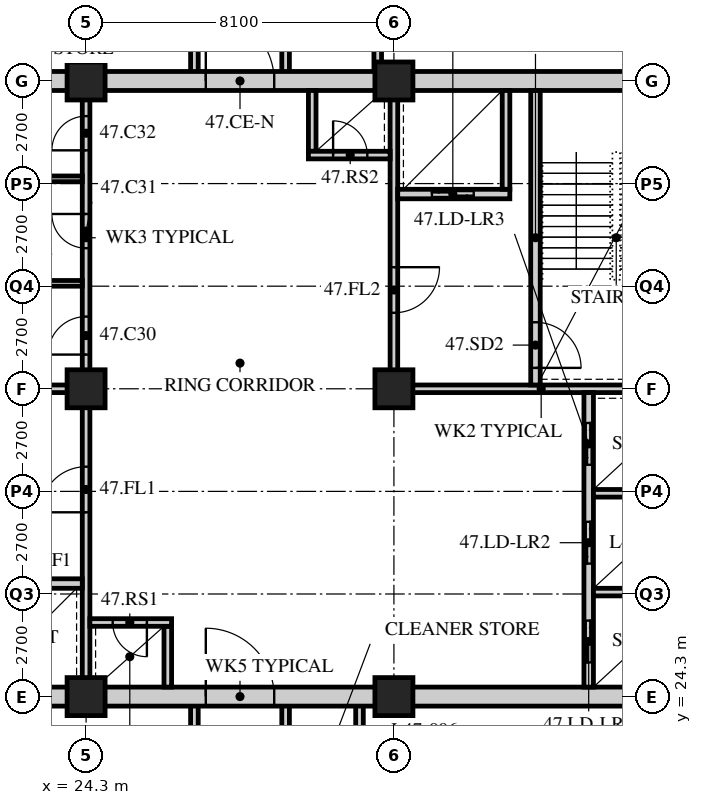
"""IFC4 building model, lengths in metres.
Left out: names, types, materials, properties, quantities, classifications, styles, units other than length and angle.
Written with IfcOpenShell. Run it as: python <this file> out.ifc"""

import sys

from ifc_helpers import new_model, si_unit, direction, frame, frame_2d, origin, origin_2d, place, context, subcontext, project, spatial, rectangle, hollow_rectangle, extrude, element, fill, save


model = new_model("IFC4")
c1 = context("Model", 3, precision=1e-05, world=origin(), true_north=direction((0.0, 1.0)))
c2 = subcontext(c1, "Body", "Model", "MODEL_VIEW")
j1 = project(units=[si_unit("LENGTHUNIT", "METRE"), si_unit("PLANEANGLEUNIT", "RADIAN")], contexts=[c1])
p1 = place(None, origin())
s1 = spatial("IfcSite", under=j1, at=p1, CompositionType="ELEMENT")
p2 = place(p1, origin())
s2 = spatial("IfcBuilding", under=s1, at=p2, CompositionType="ELEMENT")
p3 = place(p2, frame((0.0, 0.0, 184.8)))
s3 = spatial("IfcBuildingStorey", under=s2, at=p3, CompositionType="ELEMENT", Elevation=184.8)
for number, where, z_axis, x_axis in (
    (1, (24.3, 24.3, 0.0), (0.0, 0.0, 1.0), (1.0, 0.0, 0.0)),
    (2, (24.3, 32.4, 0.0), (0.0, 0.0, 1.0), (1.0, 0.0, 0.0)),
    (3, (24.3, 40.5, 0.0), (0.0, 0.0, 1.0), (1.0, 0.0, 0.0)),
    (4, (32.4, 24.3, 0.0), (0.0, 0.0, 1.0), (1.0, 0.0, 0.0)),
    (5, (32.4, 32.4, 0.0), (0.0, 0.0, 1.0), (1.0, 0.0, 0.0)),
    (6, (32.4, 40.5, 0.0), (0.0, 0.0, 1.0), (1.0, 0.0, 0.0)),
):
    element("IfcColumn", number, at=place(p3, frame(where, z_axis=z_axis, x_axis=x_axis)), inside=s3, PredefinedType="COLUMN", context=c2, shape_type="SweptSolid", body=[
        extrude(hollow_rectangle(XDim=1.0, YDim=1.0, WallThickness=0.1, at=origin_2d()), origin(), (0.0, 0.0, 1.0), 3.6),
    ])
for number, where, z_axis, x_axis in (
    (7, (31.494, 20.7, 0.0), (0.0, 0.0, 1.0), (0.0, 1.0, 0.0)),
    (8, (27.15, 20.7, 0.0), (0.0, 0.0, 1.0), (0.0, 1.0, 0.0)),
    (9, (29.55, 20.7, 0.0), (0.0, 0.0, 1.0), (0.0, 1.0, 0.0)),
):
    element("IfcWall", number, at=place(p3, frame(where, z_axis=z_axis, x_axis=x_axis)), inside=s3, PredefinedType="SOLIDWALL", context=c2, shape_type="SweptSolid", body=[
        extrude(rectangle(XDim=3.6, YDim=0.2, at=frame_2d((1.8, 0.0))), origin(), (0.0, 0.0, 1.0), 3.39),
    ])
p4 = place(p3, frame((31.974, 45.45, 0.0), z_axis=(0.0, 0.0, 1.0), x_axis=(0.0, -1.0, 0.0)))
e10 = element("IfcWall", 10, at=p4, inside=s3, PredefinedType="SOLIDWALL", context=c2, shape_type="SweptSolid", body=[
    extrude(rectangle(XDim=4.95, YDim=0.2, at=frame_2d((2.475, 0.0))), origin(), (0.0, 0.0, 1.0), 2.69),
])
for number, where, z_axis, x_axis in (
    (11, (27.15, 40.5, 0.0), (0.0, 0.0, 1.0), (0.0, 1.0, 0.0)),
    (12, (29.55, 40.5, 0.0), (0.0, 0.0, 1.0), (0.0, 1.0, 0.0)),
):
    element("IfcWall", number, at=place(p3, frame(where, z_axis=z_axis, x_axis=x_axis)), inside=s3, PredefinedType="SOLIDWALL", context=c2, shape_type="SweptSolid", body=[
        extrude(rectangle(XDim=4.95, YDim=0.2, at=frame_2d((2.475, 0.0))), origin(), (0.0, 0.0, 1.0), 3.39),
    ])
p5 = place(p3, frame((15.95, 24.3, 0.0), z_axis=(0.0, 0.0, 1.0), x_axis=(1.0, 0.0, 0.0)))
e13 = element("IfcWall", 13, at=p5, inside=s3, PredefinedType="SOLIDWALL", context=c2, shape_type="SweptSolid", body=[
    extrude(rectangle(XDim=24.8, YDim=0.5, at=frame_2d((12.4, 0.0))), origin(), (0.0, 0.0, 1.0), 2.74),
])
p6 = place(p5, frame((11.5, 0.0, 0.0)))
e14 = element("IfcOpeningElement", 14, at=p6, cuts=e13, PredefinedType="OPENING", context=c2, shape_type="SweptSolid", body=[
    extrude(rectangle(XDim=1.8, YDim=2.4, at=frame_2d((0.9, 1.2))), frame((0.0, 0.26, 0.0), z_axis=(0.0, -1.0, 0.0), x_axis=(1.0, 0.0, 0.0)), (0.0, 0.0, 1.0), 0.52),
])
p7 = place(p3, frame((15.95, 40.5, 0.0), z_axis=(0.0, 0.0, 1.0), x_axis=(1.0, 0.0, 0.0)))
e15 = element("IfcWall", 15, at=p7, inside=s3, PredefinedType="SOLIDWALL", context=c2, shape_type="SweptSolid", body=[
    extrude(rectangle(XDim=24.8, YDim=0.5, at=frame_2d((12.4, 0.0))), origin(), (0.0, 0.0, 1.0), 2.74),
])
p8 = place(p7, frame((11.5, 0.0, 0.0)))
e16 = element("IfcOpeningElement", 16, at=p8, cuts=e15, PredefinedType="OPENING", context=c2, shape_type="SweptSolid", body=[
    extrude(rectangle(XDim=1.8, YDim=2.4, at=frame_2d((0.9, 1.2))), frame((0.0, 0.26, 0.0), z_axis=(0.0, -1.0, 0.0), x_axis=(1.0, 0.0, 0.0)), (0.0, 0.0, 1.0), 0.52),
])
p9 = place(p3, frame((16.45, 32.4, 0.0), z_axis=(0.0, 0.0, 1.0), x_axis=(1.0, 0.0, 0.0)))
e17 = element("IfcWall", 17, at=p9, inside=s3, PredefinedType="SOLIDWALL", context=c2, shape_type="SweptSolid", body=[
    extrude(rectangle(XDim=7.95, YDim=0.2, at=frame_2d((3.975, 0.0))), origin(), (0.0, 0.0, 1.0), 2.778),
])
p10 = place(p3, frame((24.3, 24.55, 0.0), z_axis=(0.0, 0.0, 1.0), x_axis=(0.0, 1.0, 0.0)))
e18 = element("IfcWall", 18, at=p10, inside=s3, PredefinedType="SOLIDWALL", context=c2, shape_type="SweptSolid", body=[
    extrude(rectangle(XDim=7.75, YDim=0.2, at=frame_2d((3.875, 0.0))), origin(), (0.0, 0.0, 1.0), 2.778),
])
p11 = place(p10, frame((4.6, 0.0, 0.0)))
e19 = element("IfcOpeningElement", 19, at=p11, cuts=e18, PredefinedType="OPENING", context=c2, shape_type="SweptSolid", body=[
    extrude(rectangle(XDim=1.2, YDim=2.1, at=frame_2d((0.6, 1.05))), frame((0.0, 0.11, 0.0), z_axis=(0.0, -1.0, 0.0), x_axis=(1.0, 0.0, 0.0)), (0.0, 0.0, 1.0), 0.22),
])
p12 = place(p3, frame((21.25, 27.275, 0.0), z_axis=(0.0, 0.0, 1.0), x_axis=(1.0, 0.0, 0.0)))
e20 = element("IfcWall", 20, at=p12, inside=s3, PredefinedType="SOLIDWALL", context=c2, shape_type="SweptSolid", body=[
    extrude(rectangle(XDim=2.95, YDim=0.25, at=frame_2d((1.475, 0.0))), origin(), (0.0, 0.0, 1.0), 3.39),
])
p13 = place(p12, frame((0.95, 0.0, 0.0)))
e21 = element("IfcOpeningElement", 21, at=p13, cuts=e20, PredefinedType="OPENING", context=c2, shape_type="SweptSolid", body=[
    extrude(rectangle(XDim=1.1, YDim=2.4, at=frame_2d((0.55, 1.2))), frame((0.0, 0.135, 0.0), z_axis=(0.0, -1.0, 0.0), x_axis=(1.0, 0.0, 0.0)), (0.0, 0.0, 1.0), 0.27),
])
p14 = place(p3, frame((26.45, 24.55, 0.0), z_axis=(0.0, 0.0, 1.0), x_axis=(0.0, 1.0, 0.0)))
e22 = element("IfcWall", 22, at=p14, inside=s3, PredefinedType="SOLIDWALL", context=c2, shape_type="SweptSolid", body=[
    extrude(rectangle(XDim=1.6, YDim=0.2, at=frame_2d((0.8, 0.0))), origin(), (0.0, 0.0, 1.0), 3.39),
])
p15 = place(p3, frame((24.4, 26.25, 0.0), z_axis=(0.0, 0.0, 1.0), x_axis=(1.0, 0.0, 0.0)))
e23 = element("IfcWall", 23, at=p15, inside=s3, PredefinedType="SOLIDWALL", context=c2, shape_type="SweptSolid", body=[
    extrude(rectangle(XDim=2.15, YDim=0.2, at=frame_2d((1.075, 0.0))), origin(), (0.0, 0.0, 1.0), 3.39),
])
p16 = place(p15, frame((0.6, 0.0, 0.0)))
e24 = element("IfcOpeningElement", 24, at=p16, cuts=e23, PredefinedType="OPENING", context=c2, shape_type="SweptSolid", body=[
    extrude(rectangle(XDim=0.9, YDim=2.1, at=frame_2d((0.45, 1.05))), frame((0.0, 0.11, 0.0), z_axis=(0.0, -1.0, 0.0), x_axis=(1.0, 0.0, 0.0)), (0.0, 0.0, 1.0), 0.22),
])
p17 = place(p3, frame((32.3, 32.4, 0.0), z_axis=(0.0, 0.0, 1.0), x_axis=(1.0, 0.0, 0.0)))
e25 = element("IfcWall", 25, at=p17, inside=s3, PredefinedType="SOLIDWALL", context=c2, shape_type="SweptSolid", body=[
    extrude(rectangle(XDim=7.95, YDim=0.2, at=frame_2d((3.975, 0.0))), origin(), (0.0, 0.0, 1.0), 2.778),
])
p18 = place(p3, frame((32.4, 32.5, 0.0), z_axis=(0.0, 0.0, 1.0), x_axis=(0.0, 1.0, 0.0)))
e26 = element("IfcWall", 26, at=p18, inside=s3, PredefinedType="SOLIDWALL", context=c2, shape_type="SweptSolid", body=[
    extrude(rectangle(XDim=7.75, YDim=0.2, at=frame_2d((3.875, 0.0))), origin(), (0.0, 0.0, 1.0), 2.778),
])
p19 = place(p18, frame((1.9, 0.0, 0.0)))
e27 = element("IfcOpeningElement", 27, at=p19, cuts=e26, PredefinedType="OPENING", context=c2, shape_type="SweptSolid", body=[
    extrude(rectangle(XDim=1.2, YDim=2.1, at=frame_2d((0.6, 1.05))), frame((0.0, 0.11, 0.0), z_axis=(0.0, -1.0, 0.0), x_axis=(1.0, 0.0, 0.0)), (0.0, 0.0, 1.0), 0.22),
])
p20 = place(p3, frame((37.525, 24.55, 0.0), z_axis=(0.0, 0.0, 1.0), x_axis=(0.0, 1.0, 0.0)))
e28 = element("IfcWall", 28, at=p20, inside=s3, PredefinedType="SOLIDWALL", context=c2, shape_type="SweptSolid", body=[
    extrude(rectangle(XDim=7.75, YDim=0.25, at=frame_2d((3.875, 0.0))), origin(), (0.0, 0.0, 1.0), 3.39),
])
p21 = place(p20, frame((0.65, 0.0, 0.0)))
e29 = element("IfcOpeningElement", 29, at=p21, cuts=e28, PredefinedType="OPENING", context=c2, shape_type="SweptSolid", body=[
    extrude(rectangle(XDim=1.1, YDim=2.4, at=frame_2d((0.55, 1.2))), frame((0.0, 0.135, 0.0), z_axis=(0.0, -1.0, 0.0), x_axis=(1.0, 0.0, 0.0)), (0.0, 0.0, 1.0), 0.27),
])
p22 = place(p20, frame((3.25, 0.0, 0.0)))
e30 = element("IfcOpeningElement", 30, at=p22, cuts=e28, PredefinedType="OPENING", context=c2, shape_type="SweptSolid", body=[
    extrude(rectangle(XDim=1.1, YDim=2.4, at=frame_2d((0.55, 1.2))), frame((0.0, 0.135, 0.0), z_axis=(0.0, -1.0, 0.0), x_axis=(1.0, 0.0, 0.0)), (0.0, 0.0, 1.0), 0.27),
])
p23 = place(p20, frame((5.85, 0.0, 0.0)))
e31 = element("IfcOpeningElement", 31, at=p23, cuts=e28, PredefinedType="OPENING", context=c2, shape_type="SweptSolid", body=[
    extrude(rectangle(XDim=1.1, YDim=2.4, at=frame_2d((0.55, 1.2))), frame((0.0, 0.135, 0.0), z_axis=(0.0, -1.0, 0.0), x_axis=(1.0, 0.0, 0.0)), (0.0, 0.0, 1.0), 0.27),
])
for number, where, z_axis, x_axis in (
    (32, (37.65, 27.05, 0.0), (0.0, 0.0, 1.0), (1.0, 0.0, 0.0)),
    (33, (37.65, 29.65, 0.0), (0.0, 0.0, 1.0), (1.0, 0.0, 0.0)),
):
    element("IfcWall", number, at=place(p3, frame(where, z_axis=z_axis, x_axis=x_axis)), inside=s3, PredefinedType="SOLIDWALL", context=c2, shape_type="SweptSolid", body=[
        extrude(rectangle(XDim=2.6, YDim=0.2, at=frame_2d((1.3, 0.0))), origin(), (0.0, 0.0, 1.0), 3.39),
    ])
p24 = place(p3, frame((36.125, 32.5, 0.0), z_axis=(0.0, 0.0, 1.0), x_axis=(0.0, 1.0, 0.0)))
e34 = element("IfcWall", 34, at=p24, inside=s3, PredefinedType="SOLIDWALL", context=c2, shape_type="SweptSolid", body=[
    extrude(rectangle(XDim=7.75, YDim=0.25, at=frame_2d((3.875, 0.0))), origin(), (0.0, 0.0, 1.0), 3.39),
])
p25 = place(p24, frame((0.45, 0.0, 0.0)))
e35 = element("IfcOpeningElement", 35, at=p25, cuts=e34, PredefinedType="OPENING", context=c2, shape_type="SweptSolid", body=[
    extrude(rectangle(XDim=1.2, YDim=2.1, at=frame_2d((0.6, 1.05))), frame((0.0, 0.135, 0.0), z_axis=(0.0, -1.0, 0.0), x_axis=(1.0, 0.0, 0.0)), (0.0, 0.0, 1.0), 0.27),
])
p26 = place(p3, frame((32.5, 37.525, 0.0), z_axis=(0.0, 0.0, 1.0), x_axis=(1.0, 0.0, 0.0)))
e36 = element("IfcWall", 36, at=p26, inside=s3, PredefinedType="SOLIDWALL", context=c2, shape_type="SweptSolid", body=[
    extrude(rectangle(XDim=2.95, YDim=0.25, at=frame_2d((1.475, 0.0))), origin(), (0.0, 0.0, 1.0), 3.39),
])
p27 = place(p26, frame((0.9, 0.0, 0.0)))
e37 = element("IfcOpeningElement", 37, at=p27, cuts=e36, PredefinedType="OPENING", context=c2, shape_type="SweptSolid", body=[
    extrude(rectangle(XDim=1.1, YDim=2.4, at=frame_2d((0.55, 1.2))), frame((0.0, 0.135, 0.0), z_axis=(0.0, -1.0, 0.0), x_axis=(1.0, 0.0, 0.0)), (0.0, 0.0, 1.0), 0.27),
])
p28 = place(p3, frame((35.35, 37.65, 0.0), z_axis=(0.0, 0.0, 1.0), x_axis=(0.0, 1.0, 0.0)))
e38 = element("IfcWall", 38, at=p28, inside=s3, PredefinedType="SOLIDWALL", context=c2, shape_type="SweptSolid", body=[
    extrude(rectangle(XDim=2.6, YDim=0.2, at=frame_2d((1.3, 0.0))), origin(), (0.0, 0.0, 1.0), 3.39),
])
p29 = place(p3, frame((30.25, 38.65, 0.0), z_axis=(0.0, 0.0, 1.0), x_axis=(0.0, 1.0, 0.0)))
e39 = element("IfcWall", 39, at=p29, inside=s3, PredefinedType="SOLIDWALL", context=c2, shape_type="SweptSolid", body=[
    extrude(rectangle(XDim=1.6, YDim=0.2, at=frame_2d((0.8, 0.0))), origin(), (0.0, 0.0, 1.0), 3.39),
])
p30 = place(p3, frame((30.15, 38.55, 0.0), z_axis=(0.0, 0.0, 1.0), x_axis=(1.0, 0.0, 0.0)))
e40 = element("IfcWall", 40, at=p30, inside=s3, PredefinedType="SOLIDWALL", context=c2, shape_type="SweptSolid", body=[
    extrude(rectangle(XDim=2.15, YDim=0.2, at=frame_2d((1.075, 0.0))), origin(), (0.0, 0.0, 1.0), 3.39),
])
p31 = place(p30, frame((0.65, 0.0, 0.0)))
e41 = element("IfcOpeningElement", 41, at=p31, cuts=e40, PredefinedType="OPENING", context=c2, shape_type="SweptSolid", body=[
    extrude(rectangle(XDim=0.9, YDim=2.1, at=frame_2d((0.45, 1.05))), frame((0.0, 0.11, 0.0), z_axis=(0.0, -1.0, 0.0), x_axis=(1.0, 0.0, 0.0)), (0.0, 0.0, 1.0), 0.22),
])
p32 = place(p3, frame((24.3, 32.5, 0.0), z_axis=(0.0, 0.0, 1.0), x_axis=(0.0, 1.0, 0.0)))
e42 = element("IfcWall", 42, at=p32, inside=s3, PredefinedType="PARTITIONING", context=c2, shape_type="SweptSolid", body=[
    extrude(rectangle(XDim=7.75, YDim=0.2, at=frame_2d((3.875, 0.0))), origin(), (0.0, 0.0, 1.0), 2.778),
])
p33 = place(p32, frame((0.8, 0.0, 0.0)))
e43 = element("IfcOpeningElement", 43, at=p33, cuts=e42, PredefinedType="OPENING", context=c2, shape_type="SweptSolid", body=[
    extrude(rectangle(XDim=1.0, YDim=2.1, at=frame_2d((0.5, 1.05))), frame((0.0, 0.11, 0.0), z_axis=(0.0, -1.0, 0.0), x_axis=(1.0, 0.0, 0.0)), (0.0, 0.0, 1.0), 0.22),
])
p34 = place(p32, frame((3.6, 0.0, 0.0)))
e44 = element("IfcOpeningElement", 44, at=p34, cuts=e42, PredefinedType="OPENING", context=c2, shape_type="SweptSolid", body=[
    extrude(rectangle(XDim=0.9, YDim=2.1, at=frame_2d((0.45, 1.05))), frame((0.0, 0.11, 0.0), z_axis=(0.0, -1.0, 0.0), x_axis=(1.0, 0.0, 0.0)), (0.0, 0.0, 1.0), 0.22),
])
p35 = place(p32, frame((6.175, 0.0, 0.0)))
e45 = element("IfcOpeningElement", 45, at=p35, cuts=e42, PredefinedType="OPENING", context=c2, shape_type="SweptSolid", body=[
    extrude(rectangle(XDim=0.9, YDim=2.1, at=frame_2d((0.45, 1.05))), frame((0.0, 0.11, 0.0), z_axis=(0.0, -1.0, 0.0), x_axis=(1.0, 0.0, 0.0)), (0.0, 0.0, 1.0), 0.22),
])
for number, where, z_axis, x_axis in (
    (46, (21.65, 35.175, 0.0), (0.0, 0.0, 1.0), (1.0, 0.0, 0.0)),
    (47, (21.65, 37.925, 0.0), (0.0, 0.0, 1.0), (1.0, 0.0, 0.0)),
):
    element("IfcWall", number, at=place(p3, frame(where, z_axis=z_axis, x_axis=x_axis)), inside=s3, PredefinedType="PARTITIONING", context=c2, shape_type="SweptSolid", body=[
        extrude(rectangle(XDim=2.55, YDim=0.15, at=frame_2d((1.275, 0.0))), origin(), (0.0, 0.0, 1.0), 3.39),
    ])
p36 = place(p33, origin())
e48 = element("IfcDoor", 48, at=p36, inside=s3, OperationType="SINGLE_SWING_LEFT", PredefinedType="DOOR", context=c2, shape_type="SweptSolid", body=[
    extrude(rectangle(XDim=1.0, YDim=2.1, at=frame_2d((0.5, 1.05))), frame((0.0, 0.025, 0.0), z_axis=(0.0, -1.0, 0.0), x_axis=(1.0, 0.0, 0.0)), (0.0, 0.0, 1.0), 0.05),
])
fill(e43, e48)
p37 = place(p34, origin())
e49 = element("IfcDoor", 49, at=p37, inside=s3, OperationType="SINGLE_SWING_RIGHT", PredefinedType="DOOR", context=c2, shape_type="SweptSolid", body=[
    extrude(rectangle(XDim=0.9, YDim=2.1, at=frame_2d((0.45, 1.05))), frame((0.0, 0.025, 0.0), z_axis=(0.0, -1.0, 0.0), x_axis=(1.0, 0.0, 0.0)), (0.0, 0.0, 1.0), 0.05),
])
fill(e44, e49)
p38 = place(p35, origin())
e50 = element("IfcDoor", 50, at=p38, inside=s3, OperationType="SINGLE_SWING_LEFT", PredefinedType="DOOR", context=c2, shape_type="SweptSolid", body=[
    extrude(rectangle(XDim=0.9, YDim=2.1, at=frame_2d((0.45, 1.05))), frame((0.0, 0.025, 0.0), z_axis=(0.0, -1.0, 0.0), x_axis=(1.0, 0.0, 0.0)), (0.0, 0.0, 1.0), 0.05),
])
fill(e45, e50)
p39 = place(p11, origin())
e51 = element("IfcDoor", 51, at=p39, inside=s3, OperationType="SINGLE_SWING_LEFT", PredefinedType="DOOR", context=c2, shape_type="SweptSolid", body=[
    extrude(rectangle(XDim=1.2, YDim=2.1, at=frame_2d((0.6, 1.05))), frame((0.0, 0.025, 0.0), z_axis=(0.0, -1.0, 0.0), x_axis=(1.0, 0.0, 0.0)), (0.0, 0.0, 1.0), 0.05),
])
fill(e19, e51)
p40 = place(p16, origin())
e52 = element("IfcDoor", 52, at=p40, inside=s3, OperationType="SINGLE_SWING_LEFT", PredefinedType="DOOR", context=c2, shape_type="SweptSolid", body=[
    extrude(rectangle(XDim=0.9, YDim=2.1, at=frame_2d((0.45, 1.05))), frame((0.0, 0.025, 0.0), z_axis=(0.0, -1.0, 0.0), x_axis=(1.0, 0.0, 0.0)), (0.0, 0.0, 1.0), 0.05),
])
fill(e24, e52)
p41 = place(p25, origin())
e53 = element("IfcDoor", 53, at=p41, inside=s3, OperationType="SINGLE_SWING_RIGHT", PredefinedType="DOOR", context=c2, shape_type="SweptSolid", body=[
    extrude(rectangle(XDim=1.2, YDim=2.1, at=frame_2d((0.6, 1.05))), frame((0.0, 0.025, 0.0), z_axis=(0.0, -1.0, 0.0), x_axis=(1.0, 0.0, 0.0)), (0.0, 0.0, 1.0), 0.05),
])
fill(e35, e53)
p42 = place(p19, origin())
e54 = element("IfcDoor", 54, at=p42, inside=s3, OperationType="SINGLE_SWING_LEFT", PredefinedType="DOOR", context=c2, shape_type="SweptSolid", body=[
    extrude(rectangle(XDim=1.2, YDim=2.1, at=frame_2d((0.6, 1.05))), frame((0.0, 0.025, 0.0), z_axis=(0.0, -1.0, 0.0), x_axis=(1.0, 0.0, 0.0)), (0.0, 0.0, 1.0), 0.05),
])
fill(e27, e54)
p43 = place(p31, origin())
e55 = element("IfcDoor", 55, at=p43, inside=s3, OperationType="SINGLE_SWING_LEFT", PredefinedType="DOOR", context=c2, shape_type="SweptSolid", body=[
    extrude(rectangle(XDim=0.9, YDim=2.1, at=frame_2d((0.45, 1.05))), frame((0.0, 0.025, 0.0), z_axis=(0.0, -1.0, 0.0), x_axis=(1.0, 0.0, 0.0)), (0.0, 0.0, 1.0), 0.05),
])
fill(e41, e55)
p44 = place(p21, origin())
e56 = element("IfcDoor", 56, at=p44, inside=s3, OperationType="DOUBLE_DOOR_SLIDING", PredefinedType="DOOR", context=c2, shape_type="SweptSolid", body=[
    extrude(rectangle(XDim=1.1, YDim=2.4, at=frame_2d((0.55, 1.2))), frame((0.0, 0.025, 0.0), z_axis=(0.0, -1.0, 0.0), x_axis=(1.0, 0.0, 0.0)), (0.0, 0.0, 1.0), 0.05),
])
fill(e29, e56)
p45 = place(p22, origin())
e57 = element("IfcDoor", 57, at=p45, inside=s3, OperationType="DOUBLE_DOOR_SLIDING", PredefinedType="DOOR", context=c2, shape_type="SweptSolid", body=[
    extrude(rectangle(XDim=1.1, YDim=2.4, at=frame_2d((0.55, 1.2))), frame((0.0, 0.025, 0.0), z_axis=(0.0, -1.0, 0.0), x_axis=(1.0, 0.0, 0.0)), (0.0, 0.0, 1.0), 0.05),
])
fill(e30, e57)
p46 = place(p23, origin())
e58 = element("IfcDoor", 58, at=p46, inside=s3, OperationType="DOUBLE_DOOR_SLIDING", PredefinedType="DOOR", context=c2, shape_type="SweptSolid", body=[
    extrude(rectangle(XDim=1.1, YDim=2.4, at=frame_2d((0.55, 1.2))), frame((0.0, 0.025, 0.0), z_axis=(0.0, -1.0, 0.0), x_axis=(1.0, 0.0, 0.0)), (0.0, 0.0, 1.0), 0.05),
])
fill(e31, e58)
p47 = place(p27, origin())
e59 = element("IfcDoor", 59, at=p47, inside=s3, OperationType="DOUBLE_DOOR_SLIDING", PredefinedType="DOOR", context=c2, shape_type="SweptSolid", body=[
    extrude(rectangle(XDim=1.1, YDim=2.4, at=frame_2d((0.55, 1.2))), frame((0.0, 0.025, 0.0), z_axis=(0.0, -1.0, 0.0), x_axis=(1.0, 0.0, 0.0)), (0.0, 0.0, 1.0), 0.05),
])
fill(e37, e59)
p48 = place(p6, origin())
e60 = element("IfcDoor", 60, at=p48, inside=s3, OperationType="DOUBLE_DOOR_SINGLE_SWING", PredefinedType="DOOR", context=c2, shape_type="SweptSolid", body=[
    extrude(rectangle(XDim=1.8, YDim=2.4, at=frame_2d((0.9, 1.2))), frame((0.0, 0.025, 0.0), z_axis=(0.0, -1.0, 0.0), x_axis=(1.0, 0.0, 0.0)), (0.0, 0.0, 1.0), 0.05),
])
fill(e14, e60)
p49 = place(p8, origin())
e61 = element("IfcDoor", 61, at=p49, inside=s3, OperationType="DOUBLE_DOOR_SINGLE_SWING", PredefinedType="DOOR", context=c2, shape_type="SweptSolid", body=[
    extrude(rectangle(XDim=1.8, YDim=2.4, at=frame_2d((0.9, 1.2))), frame((0.0, 0.025, 0.0), z_axis=(0.0, -1.0, 0.0), x_axis=(1.0, 0.0, 0.0)), (0.0, 0.0, 1.0), 0.05),
])
fill(e16, e61)
save(model, sys.argv[1])
